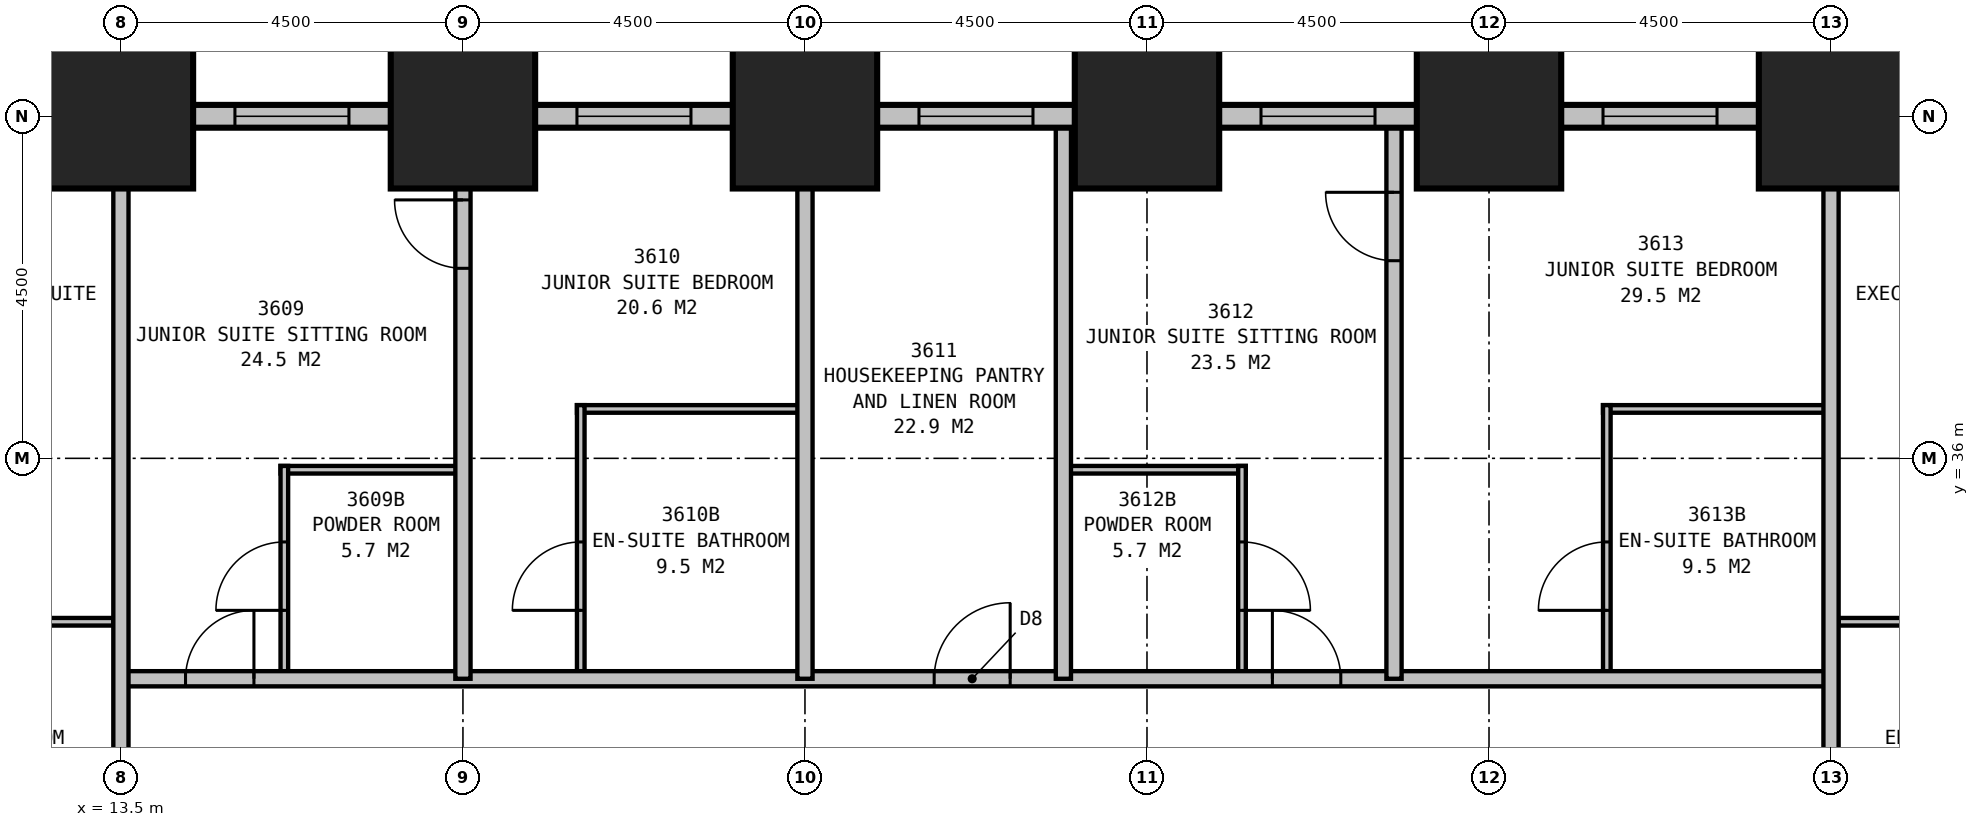
"""IFC4 building model, lengths in metres.
Left out: names, types, materials, properties, quantities, classifications, styles, units other than length and angle.
Written with IfcOpenShell. Run it as: python <this file> out.ifc"""

import sys

from ifc_helpers import new_model, si_unit, direction, frame, frame_2d, origin, origin_2d, place, context, subcontext, project, spatial, rectangle, extrude, element, fill, save


model = new_model("IFC4")
c1 = context("Model", 3, precision=1e-05, world=origin(), true_north=direction((0.0, 1.0)))
c2 = subcontext(c1, "Body", "Model", "MODEL_VIEW")
j1 = project(units=[si_unit("LENGTHUNIT", "METRE"), si_unit("PLANEANGLEUNIT", "RADIAN")], contexts=[c1])
p1 = place(None, origin())
s1 = spatial("IfcSite", under=j1, at=p1, CompositionType="ELEMENT")
p2 = place(p1, origin())
s2 = spatial("IfcBuilding", under=s1, at=p2, CompositionType="ELEMENT")
p3 = place(p2, frame((0.0, 0.0, 138.9)))
s3 = spatial("IfcBuildingStorey", under=s2, at=p3, CompositionType="ELEMENT", Elevation=138.9)
for number, where, z_axis, x_axis in (
    (1, (36.0, 40.5, 0.0), (0.0, 0.0, 1.0), (1.0, 0.0, 0.0)),
    (2, (31.5, 40.5, 0.0), (0.0, 0.0, 1.0), (1.0, 0.0, 0.0)),
    (3, (27.0, 40.5, 0.0), (0.0, 0.0, 1.0), (1.0, 0.0, 0.0)),
    (4, (22.5, 40.5, 0.0), (0.0, 0.0, 1.0), (1.0, 0.0, 0.0)),
    (5, (18.0, 40.5, 0.0), (0.0, 0.0, 1.0), (1.0, 0.0, 0.0)),
    (6, (13.5, 40.5, 0.0), (0.0, 0.0, 1.0), (1.0, 0.0, 0.0)),
):
    element("IfcColumn", number, at=place(p3, frame(where, z_axis=z_axis, x_axis=x_axis)), inside=s3, PredefinedType="COLUMN", context=c2, shape_type="SweptSolid", body=[
        extrude(rectangle(XDim=1.9, YDim=1.9, at=origin_2d()), origin(), (0.0, 0.0, 1.0), 3.5),
    ])
p4 = place(p3, frame((40.65, 40.5, 0.0), z_axis=(0.0, 0.0, 1.0), x_axis=(-1.0, 0.0, 0.0)))
e7 = element("IfcWall", 7, at=p4, inside=s3, PredefinedType="STANDARD", context=c2, shape_type="SweptSolid", body=[
    extrude(rectangle(XDim=31.8, YDim=0.3, at=frame_2d((15.9, 0.0))), origin(), (0.0, 0.0, 1.0), 2.15),
])
p5 = place(p4, frame((1.65, 0.0, 0.5)))
e8 = element("IfcOpeningElement", 8, at=p5, cuts=e7, PredefinedType="OPENING", context=c2, shape_type="SweptSolid", body=[
    extrude(rectangle(XDim=1.5, YDim=1.5, at=frame_2d((0.75, 0.75))), frame((0.0, 0.16, 0.0), z_axis=(0.0, -1.0, 0.0), x_axis=(1.0, 0.0, 0.0)), (0.0, 0.0, 1.0), 0.32),
])
p6 = place(p4, frame((6.15, 0.0, 0.5)))
e9 = element("IfcOpeningElement", 9, at=p6, cuts=e7, PredefinedType="OPENING", context=c2, shape_type="SweptSolid", body=[
    extrude(rectangle(XDim=1.5, YDim=1.5, at=frame_2d((0.75, 0.75))), frame((0.0, 0.16, 0.0), z_axis=(0.0, -1.0, 0.0), x_axis=(1.0, 0.0, 0.0)), (0.0, 0.0, 1.0), 0.32),
])
p7 = place(p4, frame((10.65, 0.0, 0.5)))
e10 = element("IfcOpeningElement", 10, at=p7, cuts=e7, PredefinedType="OPENING", context=c2, shape_type="SweptSolid", body=[
    extrude(rectangle(XDim=1.5, YDim=1.5, at=frame_2d((0.75, 0.75))), frame((0.0, 0.16, 0.0), z_axis=(0.0, -1.0, 0.0), x_axis=(1.0, 0.0, 0.0)), (0.0, 0.0, 1.0), 0.32),
])
p8 = place(p4, frame((15.15, 0.0, 0.5)))
e11 = element("IfcOpeningElement", 11, at=p8, cuts=e7, PredefinedType="OPENING", context=c2, shape_type="SweptSolid", body=[
    extrude(rectangle(XDim=1.5, YDim=1.5, at=frame_2d((0.75, 0.75))), frame((0.0, 0.16, 0.0), z_axis=(0.0, -1.0, 0.0), x_axis=(1.0, 0.0, 0.0)), (0.0, 0.0, 1.0), 0.32),
])
p9 = place(p4, frame((19.65, 0.0, 0.5)))
e12 = element("IfcOpeningElement", 12, at=p9, cuts=e7, PredefinedType="OPENING", context=c2, shape_type="SweptSolid", body=[
    extrude(rectangle(XDim=1.5, YDim=1.5, at=frame_2d((0.75, 0.75))), frame((0.0, 0.16, 0.0), z_axis=(0.0, -1.0, 0.0), x_axis=(1.0, 0.0, 0.0)), (0.0, 0.0, 1.0), 0.32),
])
p10 = place(p4, frame((24.15, 0.0, 0.5)))
e13 = element("IfcOpeningElement", 13, at=p10, cuts=e7, PredefinedType="OPENING", context=c2, shape_type="SweptSolid", body=[
    extrude(rectangle(XDim=1.5, YDim=1.5, at=frame_2d((0.75, 0.75))), frame((0.0, 0.16, 0.0), z_axis=(0.0, -1.0, 0.0), x_axis=(1.0, 0.0, 0.0)), (0.0, 0.0, 1.0), 0.32),
])
p11 = place(p4, frame((28.65, 0.0, 0.5)))
e14 = element("IfcOpeningElement", 14, at=p11, cuts=e7, PredefinedType="OPENING", context=c2, shape_type="SweptSolid", body=[
    extrude(rectangle(XDim=1.5, YDim=1.5, at=frame_2d((0.75, 0.75))), frame((0.0, 0.16, 0.0), z_axis=(0.0, -1.0, 0.0), x_axis=(1.0, 0.0, 0.0)), (0.0, 0.0, 1.0), 0.32),
])
p12 = place(p3, frame((13.5, 33.1, 0.0), z_axis=(0.0, 0.0, 1.0), x_axis=(1.0, 0.0, 0.0)))
e15 = element("IfcWall", 15, at=p12, inside=s3, PredefinedType="PARTITIONING", context=c2, shape_type="SweptSolid", body=[
    extrude(rectangle(XDim=22.5, YDim=0.2, at=frame_2d((11.25, 0.0))), origin(), (0.0, 0.0, 1.0), 3.25),
])
p13 = place(p12, frame((0.85, 0.0, 0.0)))
e16 = element("IfcOpeningElement", 16, at=p13, cuts=e15, PredefinedType="OPENING", context=c2, shape_type="SweptSolid", body=[
    extrude(rectangle(XDim=0.9, YDim=2.1, at=frame_2d((0.45, 1.05))), frame((0.0, 0.11, 0.0), z_axis=(0.0, -1.0, 0.0), x_axis=(1.0, 0.0, 0.0)), (0.0, 0.0, 1.0), 0.22),
])
p14 = place(p12, frame((10.7, 0.0, 0.0)))
e17 = element("IfcOpeningElement", 17, at=p14, cuts=e15, PredefinedType="OPENING", context=c2, shape_type="SweptSolid", body=[
    extrude(rectangle(XDim=1.0, YDim=2.1, at=frame_2d((0.5, 1.05))), frame((0.0, 0.11, 0.0), z_axis=(0.0, -1.0, 0.0), x_axis=(1.0, 0.0, 0.0)), (0.0, 0.0, 1.0), 0.22),
])
p15 = place(p12, frame((15.15, 0.0, 0.0)))
e18 = element("IfcOpeningElement", 18, at=p15, cuts=e15, PredefinedType="OPENING", context=c2, shape_type="SweptSolid", body=[
    extrude(rectangle(XDim=0.9, YDim=2.1, at=frame_2d((0.45, 1.05))), frame((0.0, 0.11, 0.0), z_axis=(0.0, -1.0, 0.0), x_axis=(1.0, 0.0, 0.0)), (0.0, 0.0, 1.0), 0.22),
])
p16 = place(p3, frame((18.0, 33.1, 0.0), z_axis=(0.0, 0.0, 1.0), x_axis=(0.0, 1.0, 0.0)))
e19 = element("IfcWall", 19, at=p16, inside=s3, PredefinedType="PARTITIONING", context=c2, shape_type="SweptSolid", body=[
    extrude(rectangle(XDim=7.4, YDim=0.2, at=frame_2d((3.7, 0.0))), origin(), (0.0, 0.0, 1.0), 2.25),
])
p17 = place(p16, frame((5.4, 0.0, 0.0)))
e20 = element("IfcOpeningElement", 20, at=p17, cuts=e19, PredefinedType="OPENING", context=c2, shape_type="SweptSolid", body=[
    extrude(rectangle(XDim=0.9, YDim=2.1, at=frame_2d((0.45, 1.05))), frame((0.0, 0.11, 0.0), z_axis=(0.0, -1.0, 0.0), x_axis=(1.0, 0.0, 0.0)), (0.0, 0.0, 1.0), 0.22),
])
p18 = place(p3, frame((22.5, 33.1, 0.0), z_axis=(0.0, 0.0, 1.0), x_axis=(0.0, 1.0, 0.0)))
e21 = element("IfcWall", 21, at=p18, inside=s3, PredefinedType="PARTITIONING", context=c2, shape_type="SweptSolid", body=[
    extrude(rectangle(XDim=7.4, YDim=0.2, at=frame_2d((3.7, 0.0))), origin(), (0.0, 0.0, 1.0), 2.25),
])
p19 = place(p3, frame((25.9, 33.1, 0.0), z_axis=(0.0, 0.0, 1.0), x_axis=(0.0, 1.0, 0.0)))
e22 = element("IfcWall", 22, at=p19, inside=s3, PredefinedType="PARTITIONING", context=c2, shape_type="SweptSolid", body=[
    extrude(rectangle(XDim=7.4, YDim=0.2, at=frame_2d((3.7, 0.0))), origin(), (0.0, 0.0, 1.0), 3.25),
])
p20 = place(p3, frame((30.25, 33.1, 0.0), z_axis=(0.0, 0.0, 1.0), x_axis=(0.0, 1.0, 0.0)))
e23 = element("IfcWall", 23, at=p20, inside=s3, PredefinedType="PARTITIONING", context=c2, shape_type="SweptSolid", body=[
    extrude(rectangle(XDim=7.4, YDim=0.2, at=frame_2d((3.7, 0.0))), origin(), (0.0, 0.0, 1.0), 3.25),
])
p21 = place(p20, frame((5.5, 0.0, 0.0)))
e24 = element("IfcOpeningElement", 24, at=p21, cuts=e23, PredefinedType="OPENING", context=c2, shape_type="SweptSolid", body=[
    extrude(rectangle(XDim=0.9, YDim=2.1, at=frame_2d((0.45, 1.05))), frame((0.0, 0.11, 0.0), z_axis=(0.0, -1.0, 0.0), x_axis=(1.0, 0.0, 0.0)), (0.0, 0.0, 1.0), 0.22),
])
p22 = place(p3, frame((15.6, 35.85, 0.0), z_axis=(0.0, 0.0, 1.0), x_axis=(1.0, 0.0, 0.0)))
e25 = element("IfcWall", 25, at=p22, inside=s3, PredefinedType="PLUMBINGWALL", context=c2, shape_type="SweptSolid", body=[
    extrude(rectangle(XDim=2.4, YDim=0.1, at=frame_2d((1.2, 0.0))), origin(), (0.0, 0.0, 1.0), 3.25),
])
p23 = place(p3, frame((15.65, 33.1, 0.0), z_axis=(0.0, 0.0, 1.0), x_axis=(0.0, 1.0, 0.0)))
e26 = element("IfcWall", 26, at=p23, inside=s3, PredefinedType="PLUMBINGWALL", context=c2, shape_type="SweptSolid", body=[
    extrude(rectangle(XDim=2.8, YDim=0.1, at=frame_2d((1.4, 0.0))), origin(), (0.0, 0.0, 1.0), 3.25),
])
p24 = place(p23, frame((0.9, 0.0, 0.0)))
e27 = element("IfcOpeningElement", 27, at=p24, cuts=e26, PredefinedType="OPENING", context=c2, shape_type="SweptSolid", body=[
    extrude(rectangle(XDim=0.9, YDim=2.1, at=frame_2d((0.45, 1.05))), frame((0.0, 0.06, 0.0), z_axis=(0.0, -1.0, 0.0), x_axis=(1.0, 0.0, 0.0)), (0.0, 0.0, 1.0), 0.12),
])
p25 = place(p3, frame((19.5, 36.65, 0.0), z_axis=(0.0, 0.0, 1.0), x_axis=(1.0, 0.0, 0.0)))
e28 = element("IfcWall", 28, at=p25, inside=s3, PredefinedType="PLUMBINGWALL", context=c2, shape_type="SweptSolid", body=[
    extrude(rectangle(XDim=3.0, YDim=0.1, at=frame_2d((1.5, 0.0))), origin(), (0.0, 0.0, 1.0), 3.25),
])
p26 = place(p3, frame((19.55, 33.1, 0.0), z_axis=(0.0, 0.0, 1.0), x_axis=(0.0, 1.0, 0.0)))
e29 = element("IfcWall", 29, at=p26, inside=s3, PredefinedType="PLUMBINGWALL", context=c2, shape_type="SweptSolid", body=[
    extrude(rectangle(XDim=3.6, YDim=0.1, at=frame_2d((1.8, 0.0))), origin(), (0.0, 0.0, 1.0), 3.25),
])
p27 = place(p26, frame((0.9, 0.0, 0.0)))
e30 = element("IfcOpeningElement", 30, at=p27, cuts=e29, PredefinedType="OPENING", context=c2, shape_type="SweptSolid", body=[
    extrude(rectangle(XDim=0.9, YDim=2.1, at=frame_2d((0.45, 1.05))), frame((0.0, 0.06, 0.0), z_axis=(0.0, -1.0, 0.0), x_axis=(1.0, 0.0, 0.0)), (0.0, 0.0, 1.0), 0.12),
])
p28 = place(p3, frame((25.9, 35.85, 0.0), z_axis=(0.0, 0.0, 1.0), x_axis=(1.0, 0.0, 0.0)))
e31 = element("IfcWall", 31, at=p28, inside=s3, PredefinedType="PLUMBINGWALL", context=c2, shape_type="SweptSolid", body=[
    extrude(rectangle(XDim=2.4, YDim=0.1, at=frame_2d((1.2, 0.0))), origin(), (0.0, 0.0, 1.0), 3.25),
])
p29 = place(p3, frame((28.25, 33.1, 0.0), z_axis=(0.0, 0.0, 1.0), x_axis=(0.0, 1.0, 0.0)))
e32 = element("IfcWall", 32, at=p29, inside=s3, PredefinedType="PLUMBINGWALL", context=c2, shape_type="SweptSolid", body=[
    extrude(rectangle(XDim=2.8, YDim=0.1, at=frame_2d((1.4, 0.0))), origin(), (0.0, 0.0, 1.0), 3.25),
])
p30 = place(p29, frame((1.8, 0.0, 0.0), z_axis=(0.0, 0.0, 1.0), x_axis=(-1.0, 0.0, 0.0)))
e33 = element("IfcOpeningElement", 33, at=p30, cuts=e32, PredefinedType="OPENING", context=c2, shape_type="SweptSolid", body=[
    extrude(rectangle(XDim=0.9, YDim=2.1, at=frame_2d((0.45, 1.05))), frame((0.0, 0.06, 0.0), z_axis=(0.0, -1.0, 0.0), x_axis=(1.0, 0.0, 0.0)), (0.0, 0.0, 1.0), 0.12),
])
p31 = place(p3, frame((33.0, 36.65, 0.0), z_axis=(0.0, 0.0, 1.0), x_axis=(1.0, 0.0, 0.0)))
e34 = element("IfcWall", 34, at=p31, inside=s3, PredefinedType="PLUMBINGWALL", context=c2, shape_type="SweptSolid", body=[
    extrude(rectangle(XDim=3.0, YDim=0.1, at=frame_2d((1.5, 0.0))), origin(), (0.0, 0.0, 1.0), 3.25),
])
p32 = place(p3, frame((33.05, 33.1, 0.0), z_axis=(0.0, 0.0, 1.0), x_axis=(0.0, 1.0, 0.0)))
e35 = element("IfcWall", 35, at=p32, inside=s3, PredefinedType="PLUMBINGWALL", context=c2, shape_type="SweptSolid", body=[
    extrude(rectangle(XDim=3.6, YDim=0.1, at=frame_2d((1.8, 0.0))), origin(), (0.0, 0.0, 1.0), 3.25),
])
p33 = place(p32, frame((0.9, 0.0, 0.0)))
e36 = element("IfcOpeningElement", 36, at=p33, cuts=e35, PredefinedType="OPENING", context=c2, shape_type="SweptSolid", body=[
    extrude(rectangle(XDim=0.9, YDim=2.1, at=frame_2d((0.45, 1.05))), frame((0.0, 0.06, 0.0), z_axis=(0.0, -1.0, 0.0), x_axis=(1.0, 0.0, 0.0)), (0.0, 0.0, 1.0), 0.12),
])
p34 = place(p3, frame((36.0, 29.3, 0.0), z_axis=(0.0, 0.0, 1.0), x_axis=(0.0, 1.0, 0.0)))
e37 = element("IfcWall", 37, at=p34, inside=s3, PredefinedType="PARTITIONING", context=c2, shape_type="SweptSolid", body=[
    extrude(rectangle(XDim=11.2, YDim=0.2, at=frame_2d((5.6, 0.0))), origin(), (0.0, 0.0, 1.0), 2.25),
])
p35 = place(p3, frame((36.1, 33.85, 0.0), z_axis=(0.0, 0.0, 1.0), x_axis=(1.0, 0.0, 0.0)))
e38 = element("IfcWall", 38, at=p35, inside=s3, PredefinedType="PLUMBINGWALL", context=c2, shape_type="SweptSolid", body=[
    extrude(rectangle(XDim=3.5, YDim=0.1, at=frame_2d((1.75, 0.0))), origin(), (0.0, 0.0, 1.0), 3.25),
])
p36 = place(p35, frame((0.9, 0.0, 0.0)))
e39 = element("IfcOpeningElement", 39, at=p36, cuts=e38, PredefinedType="OPENING", context=c2, shape_type="SweptSolid", body=[
    extrude(rectangle(XDim=0.9, YDim=2.1, at=frame_2d((0.45, 1.05))), frame((0.0, 0.06, 0.0), z_axis=(0.0, -1.0, 0.0), x_axis=(1.0, 0.0, 0.0)), (0.0, 0.0, 1.0), 0.12),
])
p37 = place(p3, frame((13.5, 29.3, 0.0), z_axis=(0.0, 0.0, 1.0), x_axis=(0.0, 1.0, 0.0)))
e40 = element("IfcWall", 40, at=p37, inside=s3, PredefinedType="PARTITIONING", context=c2, shape_type="SweptSolid", body=[
    extrude(rectangle(XDim=11.2, YDim=0.2, at=frame_2d((5.6, 0.0))), origin(), (0.0, 0.0, 1.0), 2.25),
])
p38 = place(p3, frame((13.4, 33.85, 0.0), z_axis=(0.0, 0.0, 1.0), x_axis=(-1.0, 0.0, 0.0)))
e41 = element("IfcWall", 41, at=p38, inside=s3, PredefinedType="PLUMBINGWALL", context=c2, shape_type="SweptSolid", body=[
    extrude(rectangle(XDim=3.5, YDim=0.1, at=frame_2d((1.75, 0.0))), origin(), (0.0, 0.0, 1.0), 3.25),
])
p39 = place(p38, frame((1.8, 0.0, 0.0), z_axis=(0.0, 0.0, 1.0), x_axis=(-1.0, 0.0, 0.0)))
e42 = element("IfcOpeningElement", 42, at=p39, cuts=e41, PredefinedType="OPENING", context=c2, shape_type="SweptSolid", body=[
    extrude(rectangle(XDim=0.9, YDim=2.1, at=frame_2d((0.45, 1.05))), frame((0.0, 0.06, 0.0), z_axis=(0.0, -1.0, 0.0), x_axis=(1.0, 0.0, 0.0)), (0.0, 0.0, 1.0), 0.12),
])
p40 = place(p6, origin())
e43 = element("IfcWindow", 43, at=p40, inside=s3, PartitioningType="SINGLE_PANEL", PredefinedType="WINDOW", context=c2, shape_type="SweptSolid", body=[
    extrude(rectangle(XDim=1.5, YDim=1.5, at=frame_2d((0.75, 0.75))), frame((0.0, 0.03, 0.0), z_axis=(0.0, -1.0, 0.0), x_axis=(1.0, 0.0, 0.0)), (0.0, 0.0, 1.0), 0.06),
])
fill(e9, e43)
p41 = place(p7, origin())
e44 = element("IfcWindow", 44, at=p41, inside=s3, PartitioningType="SINGLE_PANEL", PredefinedType="WINDOW", context=c2, shape_type="SweptSolid", body=[
    extrude(rectangle(XDim=1.5, YDim=1.5, at=frame_2d((0.75, 0.75))), frame((0.0, 0.03, 0.0), z_axis=(0.0, -1.0, 0.0), x_axis=(1.0, 0.0, 0.0)), (0.0, 0.0, 1.0), 0.06),
])
fill(e10, e44)
p42 = place(p8, origin())
e45 = element("IfcWindow", 45, at=p42, inside=s3, PartitioningType="SINGLE_PANEL", PredefinedType="WINDOW", context=c2, shape_type="SweptSolid", body=[
    extrude(rectangle(XDim=1.5, YDim=1.5, at=frame_2d((0.75, 0.75))), frame((0.0, 0.03, 0.0), z_axis=(0.0, -1.0, 0.0), x_axis=(1.0, 0.0, 0.0)), (0.0, 0.0, 1.0), 0.06),
])
fill(e11, e45)
p43 = place(p9, origin())
e46 = element("IfcWindow", 46, at=p43, inside=s3, PartitioningType="SINGLE_PANEL", PredefinedType="WINDOW", context=c2, shape_type="SweptSolid", body=[
    extrude(rectangle(XDim=1.5, YDim=1.5, at=frame_2d((0.75, 0.75))), frame((0.0, 0.03, 0.0), z_axis=(0.0, -1.0, 0.0), x_axis=(1.0, 0.0, 0.0)), (0.0, 0.0, 1.0), 0.06),
])
fill(e12, e46)
p44 = place(p10, origin())
e47 = element("IfcWindow", 47, at=p44, inside=s3, PartitioningType="SINGLE_PANEL", PredefinedType="WINDOW", context=c2, shape_type="SweptSolid", body=[
    extrude(rectangle(XDim=1.5, YDim=1.5, at=frame_2d((0.75, 0.75))), frame((0.0, 0.03, 0.0), z_axis=(0.0, -1.0, 0.0), x_axis=(1.0, 0.0, 0.0)), (0.0, 0.0, 1.0), 0.06),
])
fill(e13, e47)
p45 = place(p13, origin())
e48 = element("IfcDoor", 48, at=p45, inside=s3, OperationType="SINGLE_SWING_RIGHT", PredefinedType="DOOR", context=c2, shape_type="SweptSolid", body=[
    extrude(rectangle(XDim=0.9, YDim=2.1, at=frame_2d((0.45, 1.05))), frame((0.0, 0.025, 0.0), z_axis=(0.0, -1.0, 0.0), x_axis=(1.0, 0.0, 0.0)), (0.0, 0.0, 1.0), 0.05),
])
fill(e16, e48)
p46 = place(p14, origin())
e49 = element("IfcDoor", 49, at=p46, inside=s3, OperationType="SINGLE_SWING_RIGHT", PredefinedType="DOOR", context=c2, shape_type="SweptSolid", body=[
    extrude(rectangle(XDim=1.0, YDim=2.1, at=frame_2d((0.5, 1.05))), frame((0.0, 0.025, 0.0), z_axis=(0.0, -1.0, 0.0), x_axis=(1.0, 0.0, 0.0)), (0.0, 0.0, 1.0), 0.05),
])
fill(e17, e49)
p47 = place(p15, origin())
e50 = element("IfcDoor", 50, at=p47, inside=s3, OperationType="SINGLE_SWING_LEFT", PredefinedType="DOOR", context=c2, shape_type="SweptSolid", body=[
    extrude(rectangle(XDim=0.9, YDim=2.1, at=frame_2d((0.45, 1.05))), frame((0.0, 0.025, 0.0), z_axis=(0.0, -1.0, 0.0), x_axis=(1.0, 0.0, 0.0)), (0.0, 0.0, 1.0), 0.05),
])
fill(e18, e50)
p48 = place(p17, origin())
e51 = element("IfcDoor", 51, at=p48, inside=s3, OperationType="SINGLE_SWING_RIGHT", PredefinedType="DOOR", context=c2, shape_type="SweptSolid", body=[
    extrude(rectangle(XDim=0.9, YDim=2.1, at=frame_2d((0.45, 1.05))), frame((0.0, 0.025, 0.0), z_axis=(0.0, -1.0, 0.0), x_axis=(1.0, 0.0, 0.0)), (0.0, 0.0, 1.0), 0.05),
])
fill(e20, e51)
p49 = place(p21, origin())
e52 = element("IfcDoor", 52, at=p49, inside=s3, OperationType="SINGLE_SWING_RIGHT", PredefinedType="DOOR", context=c2, shape_type="SweptSolid", body=[
    extrude(rectangle(XDim=0.9, YDim=2.1, at=frame_2d((0.45, 1.05))), frame((0.0, 0.025, 0.0), z_axis=(0.0, -1.0, 0.0), x_axis=(1.0, 0.0, 0.0)), (0.0, 0.0, 1.0), 0.05),
])
fill(e24, e52)
p50 = place(p24, origin())
e53 = element("IfcDoor", 53, at=p50, inside=s3, OperationType="SINGLE_SWING_LEFT", PredefinedType="DOOR", context=c2, shape_type="SweptSolid", body=[
    extrude(rectangle(XDim=0.9, YDim=2.1, at=frame_2d((0.45, 1.05))), frame((0.0, 0.025, 0.0), z_axis=(0.0, -1.0, 0.0), x_axis=(1.0, 0.0, 0.0)), (0.0, 0.0, 1.0), 0.05),
])
fill(e27, e53)
p51 = place(p27, origin())
e54 = element("IfcDoor", 54, at=p51, inside=s3, OperationType="SINGLE_SWING_LEFT", PredefinedType="DOOR", context=c2, shape_type="SweptSolid", body=[
    extrude(rectangle(XDim=0.9, YDim=2.1, at=frame_2d((0.45, 1.05))), frame((0.0, 0.025, 0.0), z_axis=(0.0, -1.0, 0.0), x_axis=(1.0, 0.0, 0.0)), (0.0, 0.0, 1.0), 0.05),
])
fill(e30, e54)
p52 = place(p30, origin())
e55 = element("IfcDoor", 55, at=p52, inside=s3, OperationType="SINGLE_SWING_RIGHT", PredefinedType="DOOR", context=c2, shape_type="SweptSolid", body=[
    extrude(rectangle(XDim=0.9, YDim=2.1, at=frame_2d((0.45, 1.05))), frame((0.0, 0.025, 0.0), z_axis=(0.0, -1.0, 0.0), x_axis=(1.0, 0.0, 0.0)), (0.0, 0.0, 1.0), 0.05),
])
fill(e33, e55)
p53 = place(p33, origin())
e56 = element("IfcDoor", 56, at=p53, inside=s3, OperationType="SINGLE_SWING_LEFT", PredefinedType="DOOR", context=c2, shape_type="SweptSolid", body=[
    extrude(rectangle(XDim=0.9, YDim=2.1, at=frame_2d((0.45, 1.05))), frame((0.0, 0.025, 0.0), z_axis=(0.0, -1.0, 0.0), x_axis=(1.0, 0.0, 0.0)), (0.0, 0.0, 1.0), 0.05),
])
fill(e36, e56)
save(model, sys.argv[1])
